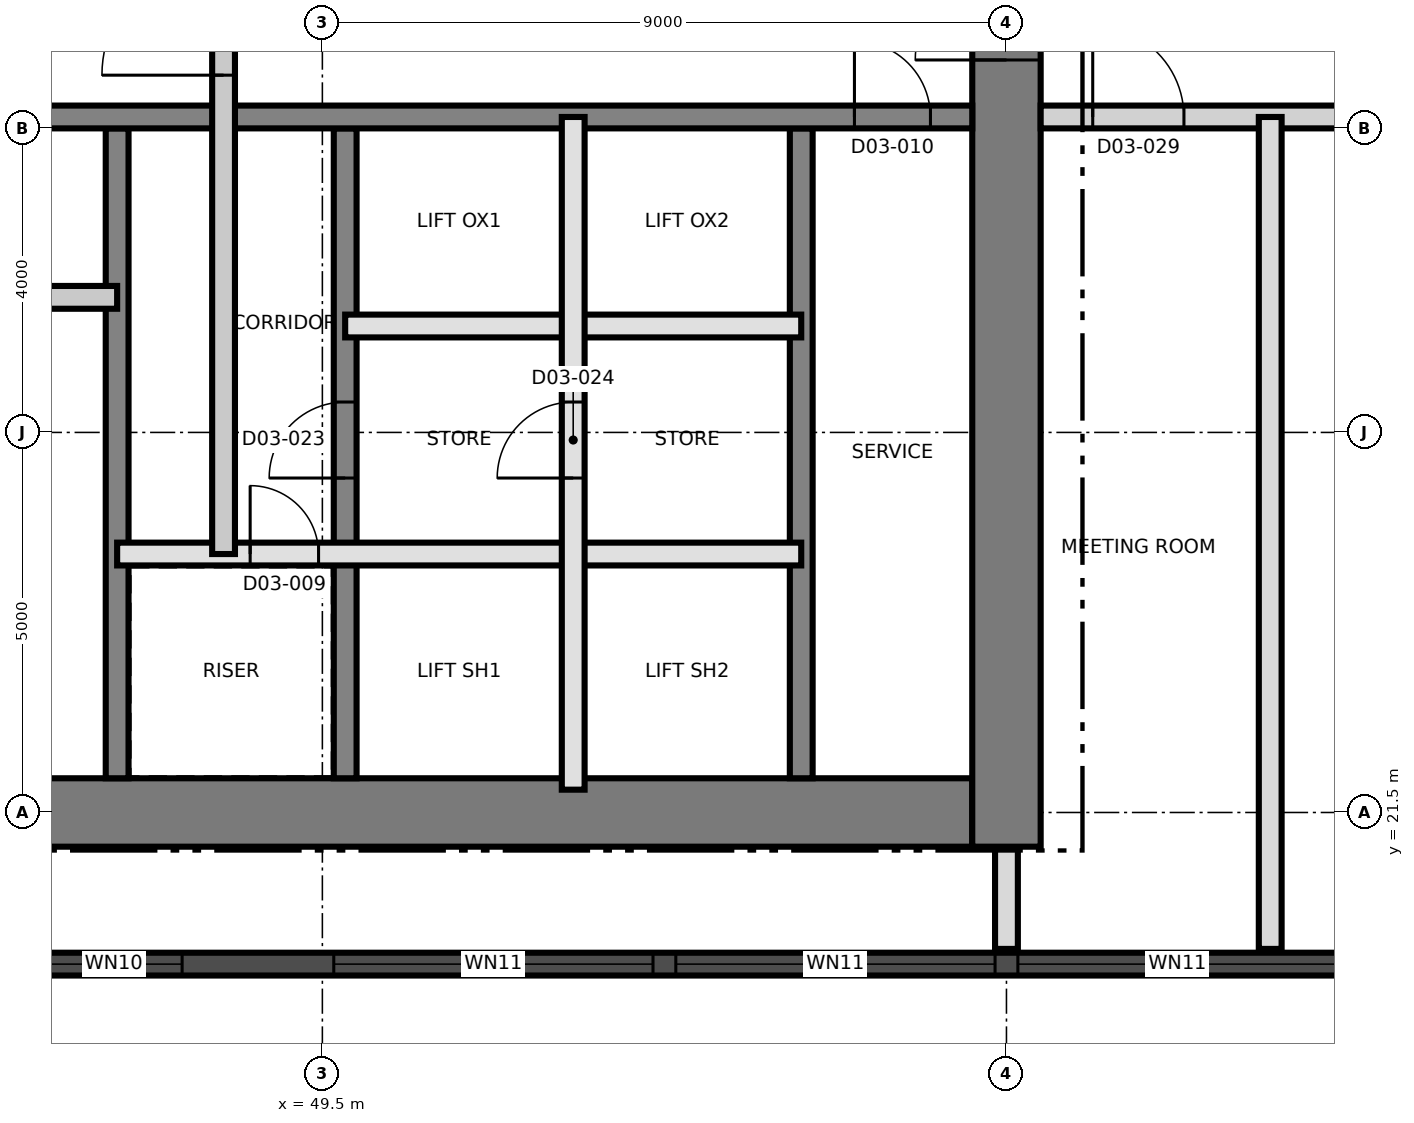
"""IFC4 building model, lengths in metres.
Left out: names, types, materials, properties, quantities, classifications, styles, units other than length and angle.
Written with IfcOpenShell. Run it as: python <this file> out.ifc"""

import sys

from ifc_helpers import new_model, si_unit, direction, frame, frame_2d, origin, place, context, subcontext, project, spatial, rectangle, extrude, element, fill, save


model = new_model("IFC4")
c1 = context("Model", 3, precision=1e-05, world=origin(), true_north=direction((0.0, 1.0)))
c2 = subcontext(c1, "Body", "Model", "MODEL_VIEW")
j1 = project(units=[si_unit("LENGTHUNIT", "METRE"), si_unit("PLANEANGLEUNIT", "RADIAN")], contexts=[c1])
p1 = place(None, origin())
s1 = spatial("IfcSite", under=j1, at=p1, CompositionType="ELEMENT")
p2 = place(p1, origin())
s2 = spatial("IfcBuilding", under=s1, at=p2, CompositionType="ELEMENT")
p3 = place(p2, frame((0.0, 0.0, 52.0)))
s3 = spatial("IfcBuildingStorey", under=s2, at=p3, CompositionType="ELEMENT", Elevation=52.0)
p4 = place(p3, frame((31.05, 21.5, 0.0), z_axis=(0.0, 0.0, 1.0), x_axis=(1.0, 0.0, 0.0)))
e1 = element("IfcWall", 1, at=p4, inside=s3, PredefinedType="SHEAR", context=c2, shape_type="SweptSolid", body=[
    extrude(rectangle(XDim=27.0, YDim=0.9, at=frame_2d((13.5, 0.0))), origin(), (0.0, 0.0, 1.0), 3.7),
])
p5 = place(p3, frame((58.5, 21.05, 0.0), z_axis=(0.0, 0.0, 1.0), x_axis=(0.0, 1.0, 0.0)))
e2 = element("IfcWall", 2, at=p5, inside=s3, PredefinedType="SHEAR", context=c2, shape_type="SweptSolid", body=[
    extrude(rectangle(XDim=18.9, YDim=0.9, at=frame_2d((9.45, 0.0))), origin(), (0.0, 0.0, 1.0), 3.7),
])
p6 = place(p5, frame((10.35, 0.0, 0.0)))
e3 = element("IfcOpeningElement", 3, at=p6, cuts=e2, PredefinedType="OPENING", context=c2, shape_type="SweptSolid", body=[
    extrude(rectangle(XDim=1.2, YDim=2.1, at=frame_2d((0.6, 1.05))), frame((0.0, 0.46, 0.0), z_axis=(0.0, -1.0, 0.0), x_axis=(1.0, 0.0, 0.0)), (0.0, 0.0, 1.0), 0.92),
])
p7 = place(p3, frame((46.8, 21.95, 0.0), z_axis=(0.0, 0.0, 1.0), x_axis=(0.0, 1.0, 0.0)))
e4 = element("IfcWall", 4, at=p7, inside=s3, PredefinedType="SHEAR", context=c2, shape_type="SweptSolid", body=[
    extrude(rectangle(XDim=8.55, YDim=0.3, at=frame_2d((4.275, 0.0))), origin(), (0.0, 0.0, 1.0), 3.7),
])
p8 = place(p3, frame((49.8, 21.95, 0.0), z_axis=(0.0, 0.0, 1.0), x_axis=(0.0, 1.0, 0.0)))
e5 = element("IfcWall", 5, at=p8, inside=s3, PredefinedType="SHEAR", context=c2, shape_type="SweptSolid", body=[
    extrude(rectangle(XDim=8.55, YDim=0.3, at=frame_2d((4.275, 0.0))), origin(), (0.0, 0.0, 1.0), 3.7),
])
p9 = place(p8, frame((3.95, 0.0, 0.0)))
e6 = element("IfcOpeningElement", 6, at=p9, cuts=e5, PredefinedType="OPENING", context=c2, shape_type="SweptSolid", body=[
    extrude(rectangle(XDim=1.0, YDim=2.1, at=frame_2d((0.5, 1.05))), frame((0.0, 0.16, 0.0), z_axis=(0.0, -1.0, 0.0), x_axis=(1.0, 0.0, 0.0)), (0.0, 0.0, 1.0), 0.32),
])
p10 = place(p3, frame((55.8, 21.95, 0.0), z_axis=(0.0, 0.0, 1.0), x_axis=(0.0, 1.0, 0.0)))
e7 = element("IfcWall", 7, at=p10, inside=s3, PredefinedType="SHEAR", context=c2, shape_type="SweptSolid", body=[
    extrude(rectangle(XDim=8.55, YDim=0.3, at=frame_2d((4.275, 0.0))), origin(), (0.0, 0.0, 1.0), 3.7),
])
p11 = place(p3, frame((31.95, 30.65, 0.0), z_axis=(0.0, 0.0, 1.0), x_axis=(1.0, 0.0, 0.0)))
e8 = element("IfcWall", 8, at=p11, inside=s3, PredefinedType="SHEAR", context=c2, shape_type="SweptSolid", body=[
    extrude(rectangle(XDim=26.1, YDim=0.3, at=frame_2d((13.05, 0.0))), origin(), (0.0, 0.0, 1.0), 3.7),
])
p12 = place(p11, frame((24.55, 0.0, 0.0)))
e9 = element("IfcOpeningElement", 9, at=p12, cuts=e8, PredefinedType="OPENING", context=c2, shape_type="SweptSolid", body=[
    extrude(rectangle(XDim=1.0, YDim=2.1, at=frame_2d((0.5, 1.05))), frame((0.0, 0.16, 0.0), z_axis=(0.0, -1.0, 0.0), x_axis=(1.0, 0.0, 0.0)), (0.0, 0.0, 1.0), 0.32),
])
p13 = place(p11, frame((11.35, 0.0, 0.0)))
e10 = element("IfcOpeningElement", 10, at=p13, cuts=e8, PredefinedType="OPENING", context=c2, shape_type="SweptSolid", body=[
    extrude(rectangle(XDim=1.0, YDim=2.1, at=frame_2d((0.5, 1.05))), frame((0.0, 0.16, 0.0), z_axis=(0.0, -1.0, 0.0), x_axis=(1.0, 0.0, 0.0)), (0.0, 0.0, 1.0), 0.32),
])
p14 = place(p3, frame((44.01, 19.505, 0.0), z_axis=(0.0, 0.0, 1.0), x_axis=(1.0, 0.0, 0.0)))
e11 = element("IfcWall", 11, at=p14, inside=s3, PredefinedType="SOLIDWALL", context=c2, shape_type="SweptSolid", body=[
    extrude(rectangle(XDim=43.478, YDim=0.3, at=frame_2d((21.739, 0.0))), origin(), (0.0, 0.0, 1.0), 3.4),
])
p15 = place(p14, frame((1.845, 0.0, 0.3)))
e12 = element("IfcOpeningElement", 12, at=p15, cuts=e11, PredefinedType="OPENING", context=c2, shape_type="SweptSolid", body=[
    extrude(rectangle(XDim=1.8, YDim=2.4, at=frame_2d((0.9, 1.2))), frame((0.0, 0.16, 0.0), z_axis=(0.0, -1.0, 0.0), x_axis=(1.0, 0.0, 0.0)), (0.0, 0.0, 1.0), 0.32),
])
p16 = place(p14, frame((5.64, 0.0, 0.9)))
e13 = element("IfcOpeningElement", 13, at=p16, cuts=e11, PredefinedType="OPENING", context=c2, shape_type="SweptSolid", body=[
    extrude(rectangle(XDim=4.2, YDim=1.5, at=frame_2d((2.1, 0.75))), frame((0.0, 0.16, 0.0), z_axis=(0.0, -1.0, 0.0), x_axis=(1.0, 0.0, 0.0)), (0.0, 0.0, 1.0), 0.32),
])
p17 = place(p14, frame((10.14, 0.0, 0.9)))
e14 = element("IfcOpeningElement", 14, at=p17, cuts=e11, PredefinedType="OPENING", context=c2, shape_type="SweptSolid", body=[
    extrude(rectangle(XDim=4.2, YDim=1.5, at=frame_2d((2.1, 0.75))), frame((0.0, 0.16, 0.0), z_axis=(0.0, -1.0, 0.0), x_axis=(1.0, 0.0, 0.0)), (0.0, 0.0, 1.0), 0.32),
])
p18 = place(p14, frame((14.64, 0.0, 0.9)))
e15 = element("IfcOpeningElement", 15, at=p18, cuts=e11, PredefinedType="OPENING", context=c2, shape_type="SweptSolid", body=[
    extrude(rectangle(XDim=4.2, YDim=1.5, at=frame_2d((2.1, 0.75))), frame((0.0, 0.16, 0.0), z_axis=(0.0, -1.0, 0.0), x_axis=(1.0, 0.0, 0.0)), (0.0, 0.0, 1.0), 0.32),
])
p19 = place(p14, frame((19.14, 0.0, 0.9)))
e16 = element("IfcOpeningElement", 16, at=p19, cuts=e11, PredefinedType="OPENING", context=c2, shape_type="SweptSolid", body=[
    extrude(rectangle(XDim=4.2, YDim=1.5, at=frame_2d((2.1, 0.75))), frame((0.0, 0.16, 0.0), z_axis=(0.0, -1.0, 0.0), x_axis=(1.0, 0.0, 0.0)), (0.0, 0.0, 1.0), 0.32),
])
p20 = place(p14, frame((23.64, 0.0, 0.9)))
e17 = element("IfcOpeningElement", 17, at=p20, cuts=e11, PredefinedType="OPENING", context=c2, shape_type="SweptSolid", body=[
    extrude(rectangle(XDim=4.2, YDim=1.5, at=frame_2d((2.1, 0.75))), frame((0.0, 0.16, 0.0), z_axis=(0.0, -1.0, 0.0), x_axis=(1.0, 0.0, 0.0)), (0.0, 0.0, 1.0), 0.32),
])
p21 = place(p14, frame((28.14, 0.0, 0.9)))
e18 = element("IfcOpeningElement", 18, at=p21, cuts=e11, PredefinedType="OPENING", context=c2, shape_type="SweptSolid", body=[
    extrude(rectangle(XDim=4.2, YDim=1.5, at=frame_2d((2.1, 0.75))), frame((0.0, 0.16, 0.0), z_axis=(0.0, -1.0, 0.0), x_axis=(1.0, 0.0, 0.0)), (0.0, 0.0, 1.0), 0.32),
])
p22 = place(p14, frame((32.64, 0.0, 0.9)))
e19 = element("IfcOpeningElement", 19, at=p22, cuts=e11, PredefinedType="OPENING", context=c2, shape_type="SweptSolid", body=[
    extrude(rectangle(XDim=4.2, YDim=1.5, at=frame_2d((2.1, 0.75))), frame((0.0, 0.16, 0.0), z_axis=(0.0, -1.0, 0.0), x_axis=(1.0, 0.0, 0.0)), (0.0, 0.0, 1.0), 0.32),
])
p23 = place(p14, frame((37.14, 0.0, 0.9)))
e20 = element("IfcOpeningElement", 20, at=p23, cuts=e11, PredefinedType="OPENING", context=c2, shape_type="SweptSolid", body=[
    extrude(rectangle(XDim=4.2, YDim=1.5, at=frame_2d((2.1, 0.75))), frame((0.0, 0.16, 0.0), z_axis=(0.0, -1.0, 0.0), x_axis=(1.0, 0.0, 0.0)), (0.0, 0.0, 1.0), 0.32),
])
p24 = place(p3, frame((46.8, 24.9, 0.0), z_axis=(0.0, 0.0, 1.0), x_axis=(1.0, 0.0, 0.0)))
e21 = element("IfcWall", 21, at=p24, inside=s3, PredefinedType="SOLIDWALL", context=c2, shape_type="SweptSolid", body=[
    extrude(rectangle(XDim=9.0, YDim=0.3, at=frame_2d((4.5, 0.0))), origin(), (0.0, 0.0, 1.0), 3.4),
])
p25 = place(p24, frame((1.75, 0.0, 0.0)))
e22 = element("IfcOpeningElement", 22, at=p25, cuts=e21, PredefinedType="OPENING", context=c2, shape_type="SweptSolid", body=[
    extrude(rectangle(XDim=0.9, YDim=2.1, at=frame_2d((0.45, 1.05))), frame((0.0, 0.16, 0.0), z_axis=(0.0, -1.0, 0.0), x_axis=(1.0, 0.0, 0.0)), (0.0, 0.0, 1.0), 0.32),
])
p26 = place(p3, frame((49.8, 27.9, 0.0), z_axis=(0.0, 0.0, 1.0), x_axis=(1.0, 0.0, 0.0)))
e23 = element("IfcWall", 23, at=p26, inside=s3, PredefinedType="SOLIDWALL", context=c2, shape_type="SweptSolid", body=[
    extrude(rectangle(XDim=6.0, YDim=0.3, at=frame_2d((3.0, 0.0))), origin(), (0.0, 0.0, 1.0), 3.4),
])
p27 = place(p3, frame((40.8, 28.277, 0.0), z_axis=(0.0, 0.0, 1.0), x_axis=(1.0, 0.0, 0.0)))
e24 = element("IfcWall", 24, at=p27, inside=s3, PredefinedType="PARTITIONING", context=c2, shape_type="SweptSolid", body=[
    extrude(rectangle(XDim=6.0, YDim=0.3, at=frame_2d((3.0, 0.0))), origin(), (0.0, 0.0, 1.0), 3.4),
])
p28 = place(p3, frame((48.2, 24.9, 0.0), z_axis=(0.0, 0.0, 1.0), x_axis=(0.0, 1.0, 0.0)))
e25 = element("IfcWall", 25, at=p28, inside=s3, PredefinedType="PARTITIONING", context=c2, shape_type="SweptSolid", body=[
    extrude(rectangle(XDim=8.45, YDim=0.3, at=frame_2d((4.225, 0.0))), origin(), (0.0, 0.0, 1.0), 3.4),
])
p29 = place(p28, frame((6.3, 0.0, 0.0)))
e26 = element("IfcOpeningElement", 26, at=p29, cuts=e25, PredefinedType="OPENING", context=c2, shape_type="SweptSolid", body=[
    extrude(rectangle(XDim=1.6, YDim=2.1, at=frame_2d((0.8, 1.05))), frame((0.0, 0.16, 0.0), z_axis=(0.0, -1.0, 0.0), x_axis=(1.0, 0.0, 0.0)), (0.0, 0.0, 1.0), 0.32),
])
p30 = place(p3, frame((52.8, 21.8, 0.0), z_axis=(0.0, 0.0, 1.0), x_axis=(0.0, 1.0, 0.0)))
e27 = element("IfcWall", 27, at=p30, inside=s3, PredefinedType="SOLIDWALL", context=c2, shape_type="SweptSolid", body=[
    extrude(rectangle(XDim=8.85, YDim=0.3, at=frame_2d((4.425, 0.0))), origin(), (0.0, 0.0, 1.0), 3.4),
])
p31 = place(p30, frame((4.1, 0.0, 0.0)))
e28 = element("IfcOpeningElement", 28, at=p31, cuts=e27, PredefinedType="OPENING", context=c2, shape_type="SweptSolid", body=[
    extrude(rectangle(XDim=1.0, YDim=2.1, at=frame_2d((0.5, 1.05))), frame((0.0, 0.16, 0.0), z_axis=(0.0, -1.0, 0.0), x_axis=(1.0, 0.0, 0.0)), (0.0, 0.0, 1.0), 0.32),
])
p32 = place(p3, frame((58.95, 30.65, 0.0), z_axis=(0.0, 0.0, 1.0), x_axis=(1.0, 0.0, 0.0)))
e29 = element("IfcWall", 29, at=p32, inside=s3, PredefinedType="PARTITIONING", context=c2, shape_type="SweptSolid", body=[
    extrude(rectangle(XDim=26.38, YDim=0.3, at=frame_2d((13.19, 0.0))), origin(), (0.0, 0.0, 1.0), 3.4),
])
p33 = place(p32, frame((0.685, 0.0, 0.0)))
e30 = element("IfcOpeningElement", 30, at=p33, cuts=e29, PredefinedType="OPENING", context=c2, shape_type="SweptSolid", body=[
    extrude(rectangle(XDim=1.2, YDim=2.1, at=frame_2d((0.6, 1.05))), frame((0.0, 0.16, 0.0), z_axis=(0.0, -1.0, 0.0), x_axis=(1.0, 0.0, 0.0)), (0.0, 0.0, 1.0), 0.32),
])
p34 = place(p32, frame((3.935, 0.0, 0.0)))
e31 = element("IfcOpeningElement", 31, at=p34, cuts=e29, PredefinedType="OPENING", context=c2, shape_type="SweptSolid", body=[
    extrude(rectangle(XDim=1.0, YDim=2.1, at=frame_2d((0.5, 1.05))), frame((0.0, 0.16, 0.0), z_axis=(0.0, -1.0, 0.0), x_axis=(1.0, 0.0, 0.0)), (0.0, 0.0, 1.0), 0.32),
])
p35 = place(p32, frame((9.685, 0.0, 0.0)))
e32 = element("IfcOpeningElement", 32, at=p35, cuts=e29, PredefinedType="OPENING", context=c2, shape_type="SweptSolid", body=[
    extrude(rectangle(XDim=1.2, YDim=2.1, at=frame_2d((0.6, 1.05))), frame((0.0, 0.16, 0.0), z_axis=(0.0, -1.0, 0.0), x_axis=(1.0, 0.0, 0.0)), (0.0, 0.0, 1.0), 0.32),
])
p36 = place(p32, frame((12.935, 0.0, 0.0)))
e33 = element("IfcOpeningElement", 33, at=p36, cuts=e29, PredefinedType="OPENING", context=c2, shape_type="SweptSolid", body=[
    extrude(rectangle(XDim=1.0, YDim=2.1, at=frame_2d((0.5, 1.05))), frame((0.0, 0.16, 0.0), z_axis=(0.0, -1.0, 0.0), x_axis=(1.0, 0.0, 0.0)), (0.0, 0.0, 1.0), 0.32),
])
p37 = place(p32, frame((21.55, 0.0, 0.0)))
e34 = element("IfcOpeningElement", 34, at=p37, cuts=e29, PredefinedType="OPENING", context=c2, shape_type="SweptSolid", body=[
    extrude(rectangle(XDim=1.0, YDim=2.4, at=frame_2d((0.5, 1.2))), frame((0.0, 0.16, 0.0), z_axis=(0.0, -1.0, 0.0), x_axis=(1.0, 0.0, 0.0)), (0.0, 0.0, 1.0), 0.32),
])
p38 = place(p3, frame((58.5, 19.705, 0.0), z_axis=(0.0, 0.0, 1.0), x_axis=(0.0, 1.0, 0.0)))
e35 = element("IfcWall", 35, at=p38, inside=s3, PredefinedType="PARTITIONING", context=c2, shape_type="SweptSolid", body=[
    extrude(rectangle(XDim=1.325, YDim=0.3, at=frame_2d((0.663, 0.0))), origin(), (0.0, 0.0, 1.0), 3.4),
])
p39 = place(p3, frame((61.97, 19.705, 0.0), z_axis=(0.0, 0.0, 1.0), x_axis=(0.0, 1.0, 0.0)))
e36 = element("IfcWall", 36, at=p39, inside=s3, PredefinedType="PARTITIONING", context=c2, shape_type="SweptSolid", body=[
    extrude(rectangle(XDim=10.945, YDim=0.3, at=frame_2d((5.472, 0.0))), origin(), (0.0, 0.0, 1.0), 3.4),
])
p40 = place(p15, origin())
e37 = element("IfcWindow", 37, at=p40, inside=s3, PartitioningType="SINGLE_PANEL", PredefinedType="WINDOW", context=c2, shape_type="SweptSolid", body=[
    extrude(rectangle(XDim=1.8, YDim=2.4, at=frame_2d((0.9, 1.2))), frame((0.0, 0.03, 0.0), z_axis=(0.0, -1.0, 0.0), x_axis=(1.0, 0.0, 0.0)), (0.0, 0.0, 1.0), 0.06),
])
fill(e12, e37)
p41 = place(p16, origin())
e38 = element("IfcWindow", 38, at=p41, inside=s3, PartitioningType="SINGLE_PANEL", PredefinedType="WINDOW", context=c2, shape_type="SweptSolid", body=[
    extrude(rectangle(XDim=4.2, YDim=1.5, at=frame_2d((2.1, 0.75))), frame((0.0, 0.03, 0.0), z_axis=(0.0, -1.0, 0.0), x_axis=(1.0, 0.0, 0.0)), (0.0, 0.0, 1.0), 0.06),
])
fill(e13, e38)
p42 = place(p17, origin())
e39 = element("IfcWindow", 39, at=p42, inside=s3, PartitioningType="SINGLE_PANEL", PredefinedType="WINDOW", context=c2, shape_type="SweptSolid", body=[
    extrude(rectangle(XDim=4.2, YDim=1.5, at=frame_2d((2.1, 0.75))), frame((0.0, 0.03, 0.0), z_axis=(0.0, -1.0, 0.0), x_axis=(1.0, 0.0, 0.0)), (0.0, 0.0, 1.0), 0.06),
])
fill(e14, e39)
p43 = place(p18, origin())
e40 = element("IfcWindow", 40, at=p43, inside=s3, PartitioningType="SINGLE_PANEL", PredefinedType="WINDOW", context=c2, shape_type="SweptSolid", body=[
    extrude(rectangle(XDim=4.2, YDim=1.5, at=frame_2d((2.1, 0.75))), frame((0.0, 0.03, 0.0), z_axis=(0.0, -1.0, 0.0), x_axis=(1.0, 0.0, 0.0)), (0.0, 0.0, 1.0), 0.06),
])
fill(e15, e40)
p44 = place(p29, origin())
e41 = element("IfcDoor", 41, at=p44, inside=s3, OperationType="SINGLE_SWING_LEFT", PredefinedType="DOOR", context=c2, shape_type="SweptSolid", body=[
    extrude(rectangle(XDim=1.6, YDim=2.1, at=frame_2d((0.8, 1.05))), frame((0.0, 0.025, 0.0), z_axis=(0.0, -1.0, 0.0), x_axis=(1.0, 0.0, 0.0)), (0.0, 0.0, 1.0), 0.05),
])
fill(e26, e41)
p45 = place(p25, origin())
e42 = element("IfcDoor", 42, at=p45, inside=s3, OperationType="SINGLE_SWING_RIGHT", PredefinedType="DOOR", context=c2, shape_type="SweptSolid", body=[
    extrude(rectangle(XDim=0.9, YDim=2.1, at=frame_2d((0.45, 1.05))), frame((0.0, 0.025, 0.0), z_axis=(0.0, -1.0, 0.0), x_axis=(1.0, 0.0, 0.0)), (0.0, 0.0, 1.0), 0.05),
])
fill(e22, e42)
p46 = place(p12, origin())
e43 = element("IfcDoor", 43, at=p46, inside=s3, OperationType="SINGLE_SWING_LEFT", PredefinedType="DOOR", context=c2, shape_type="SweptSolid", body=[
    extrude(rectangle(XDim=1.0, YDim=2.1, at=frame_2d((0.5, 1.05))), frame((0.0, 0.025, 0.0), z_axis=(0.0, -1.0, 0.0), x_axis=(1.0, 0.0, 0.0)), (0.0, 0.0, 1.0), 0.05),
])
fill(e9, e43)
p47 = place(p6, origin())
e44 = element("IfcDoor", 44, at=p47, inside=s3, OperationType="SINGLE_SWING_LEFT", PredefinedType="DOOR", context=c2, shape_type="SweptSolid", body=[
    extrude(rectangle(XDim=1.2, YDim=2.1, at=frame_2d((0.6, 1.05))), frame((0.0, 0.025, 0.0), z_axis=(0.0, -1.0, 0.0), x_axis=(1.0, 0.0, 0.0)), (0.0, 0.0, 1.0), 0.05),
])
fill(e3, e44)
p48 = place(p9, origin())
e45 = element("IfcDoor", 45, at=p48, inside=s3, OperationType="SINGLE_SWING_LEFT", PredefinedType="DOOR", context=c2, shape_type="SweptSolid", body=[
    extrude(rectangle(XDim=1.0, YDim=2.1, at=frame_2d((0.5, 1.05))), frame((0.0, 0.025, 0.0), z_axis=(0.0, -1.0, 0.0), x_axis=(1.0, 0.0, 0.0)), (0.0, 0.0, 1.0), 0.05),
])
fill(e6, e45)
p49 = place(p31, origin())
e46 = element("IfcDoor", 46, at=p49, inside=s3, OperationType="SINGLE_SWING_RIGHT", PredefinedType="DOOR", context=c2, shape_type="SweptSolid", body=[
    extrude(rectangle(XDim=1.0, YDim=2.1, at=frame_2d((0.5, 1.05))), frame((0.0, 0.025, 0.0), z_axis=(0.0, -1.0, 0.0), x_axis=(1.0, 0.0, 0.0)), (0.0, 0.0, 1.0), 0.05),
])
fill(e28, e46)
p50 = place(p33, origin())
e47 = element("IfcDoor", 47, at=p50, inside=s3, OperationType="SINGLE_SWING_LEFT", PredefinedType="DOOR", context=c2, shape_type="SweptSolid", body=[
    extrude(rectangle(XDim=1.2, YDim=2.1, at=frame_2d((0.6, 1.05))), frame((0.0, 0.025, 0.0), z_axis=(0.0, -1.0, 0.0), x_axis=(1.0, 0.0, 0.0)), (0.0, 0.0, 1.0), 0.05),
])
fill(e30, e47)
save(model, sys.argv[1])
